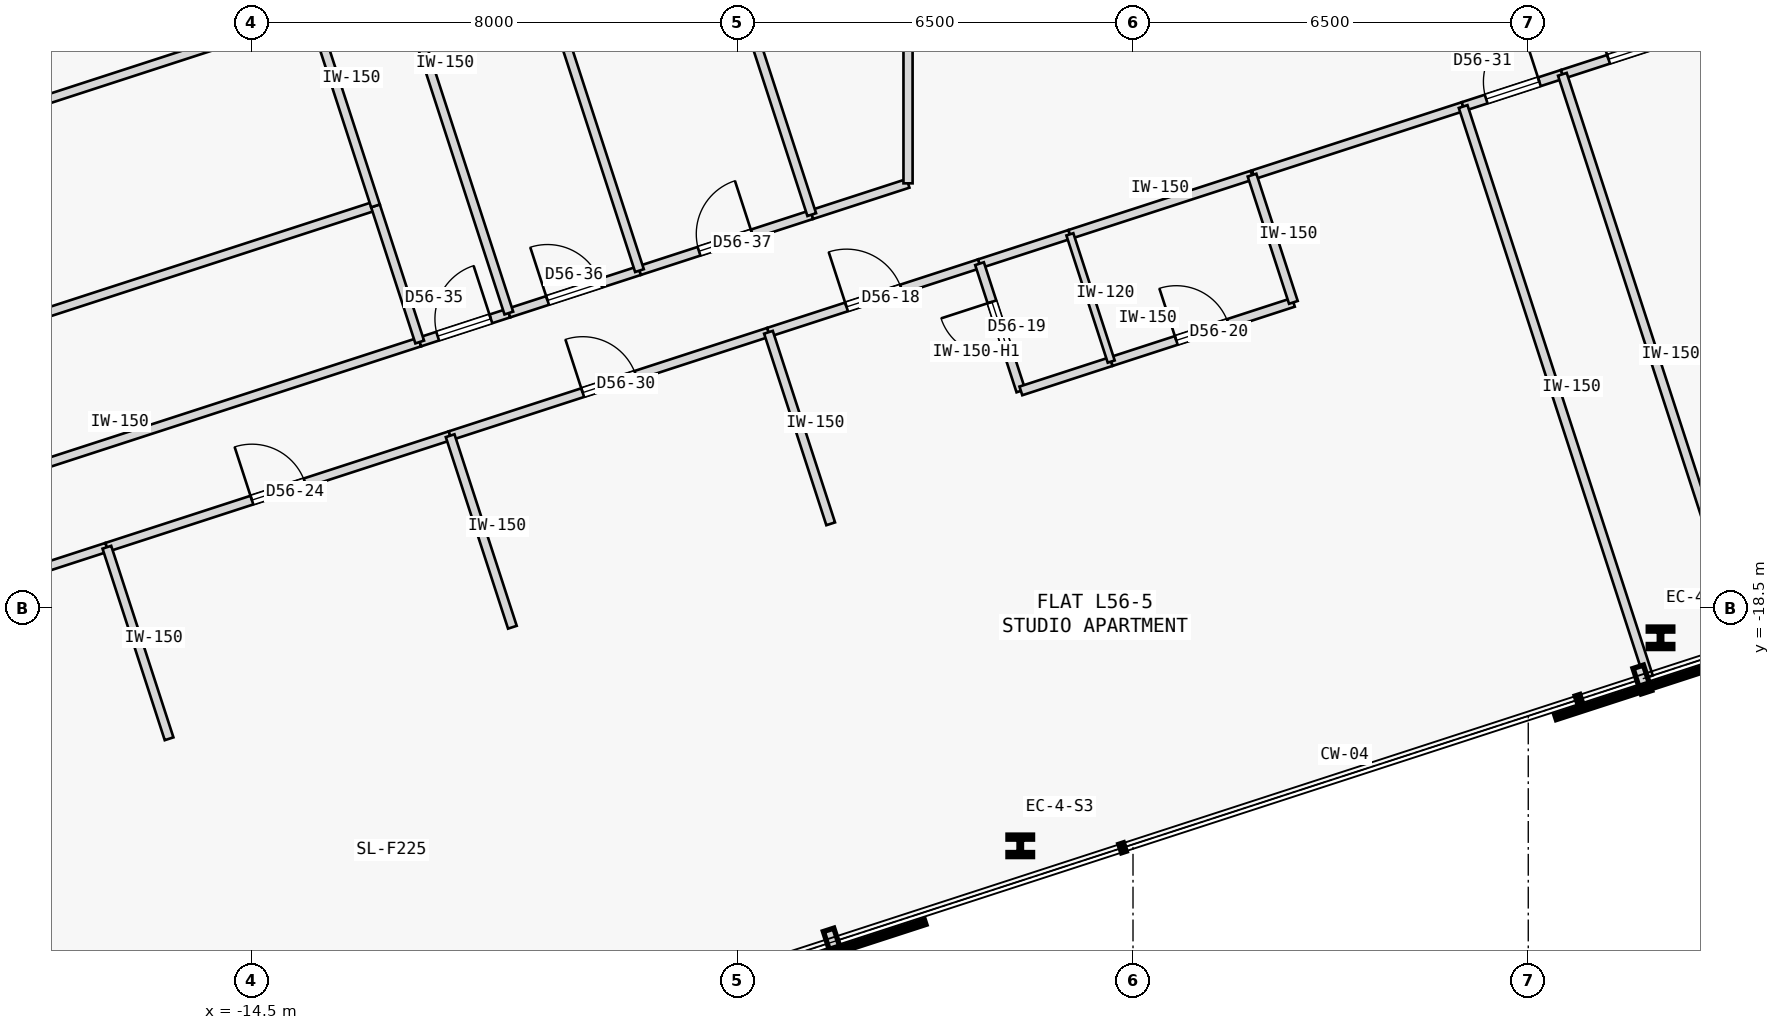
"""IFC4 building model, lengths in metres.
Left out: names, types, materials, properties, quantities, classifications, styles, units other than length and angle.
Written with IfcOpenShell. Run it as: python <this file> out.ifc"""

import sys

from ifc_helpers import new_model, si_unit, direction, frame, frame_2d, origin, origin_2d, place, context, subcontext, project, spatial, rectangle, i_section, extrude, element, fill, save


model = new_model("IFC4")
c1 = context("Model", 3, precision=1e-05, world=origin(), true_north=direction((0.0, 1.0)))
c2 = subcontext(c1, "Body", "Model", "MODEL_VIEW")
j1 = project(units=[si_unit("LENGTHUNIT", "METRE"), si_unit("PLANEANGLEUNIT", "RADIAN")], contexts=[c1])
p1 = place(None, origin())
s1 = spatial("IfcSite", under=j1, at=p1, CompositionType="ELEMENT")
p2 = place(p1, origin())
s2 = spatial("IfcBuilding", under=s1, at=p2, CompositionType="ELEMENT")
p3 = place(p2, frame((0.0, 0.0, 214.25)))
s3 = spatial("IfcBuildingStorey", under=s2, at=p3, CompositionType="ELEMENT", Elevation=214.25)
for number, where, z_axis, x_axis in (
    (1, (-1.854, -22.409, 0.0), (0.0, 0.0, 1.0), (1.0, 0.0, 0.0)),
    (2, (8.675, -18.988, 0.0), (0.0, 0.0, 1.0), (1.0, 0.0, 0.0)),
):
    element("IfcColumn", number, at=place(p3, frame(where, z_axis=z_axis, x_axis=x_axis)), inside=s3, PredefinedType="COLUMN", context=c2, shape_type="SweptSolid", body=[
        extrude(i_section(OverallWidth=0.405, OverallDepth=0.355, WebThickness=0.042, FlangeThickness=0.068, FilletRadius=0.015, at=origin_2d()), origin(), (0.0, 0.0, 1.0), 3.35),
    ])
p4 = place(p3, frame((-20.347, -18.626, 0.0), z_axis=(0.0, 0.0, 1.0), x_axis=(0.951057168147, 0.309014988174, 0.0)))
e3 = element("IfcWall", 3, at=p4, inside=s3, PredefinedType="PARTITIONING", context=c2, shape_type="SweptSolid", body=[
    extrude(rectangle(XDim=3.65, YDim=0.15, at=frame_2d((1.825, 0.0))), origin(), (0.0, 0.0, 1.0), 3.125),
])
p5 = place(p3, frame((-5.995, -13.963, 0.0), z_axis=(0.0, 0.0, 1.0), x_axis=(0.951050780541, 0.309034646652, 0.0)))
e4 = element("IfcWall", 4, at=p5, inside=s3, PredefinedType="PARTITIONING", context=c2, shape_type="SweptSolid", body=[
    extrude(rectangle(XDim=3.65, YDim=0.15, at=frame_2d((1.825, 0.0))), origin(), (0.0, 0.0, 1.0), 3.125),
])
p6 = place(p5, frame((1.35, 0.0, 0.0)))
e5 = element("IfcOpeningElement", 5, at=p6, cuts=e4, PredefinedType="OPENING", context=c2, shape_type="SweptSolid", body=[
    extrude(rectangle(XDim=0.95, YDim=2.15, at=frame_2d((0.475, 1.075))), frame((0.0, 0.085, 0.0), z_axis=(0.0, -1.0, 0.0), x_axis=(1.0, 0.0, 0.0)), (0.0, 0.0, 1.0), 0.17),
])
p7 = place(p3, frame((1.98, -11.372, 0.0), z_axis=(0.0, 0.0, 1.0), x_axis=(0.951052868128, 0.309028222052, 0.0)))
e6 = element("IfcWall", 6, at=p7, inside=s3, PredefinedType="PARTITIONING", context=c2, shape_type="SweptSolid", body=[
    extrude(rectangle(XDim=3.626, YDim=0.15, at=frame_2d((1.813, 0.0))), origin(), (0.0, 0.0, 1.0), 3.125),
])
p8 = place(p3, frame((-2.524, -12.835, 0.0), z_axis=(0.0, 0.0, 1.0), x_axis=(0.951062779317, 0.308997718112, 0.0)))
e7 = element("IfcWall", 7, at=p8, inside=s3, PredefinedType="PARTITIONING", context=c2, shape_type="SweptSolid", body=[
    extrude(rectangle(XDim=1.562, YDim=0.15, at=frame_2d((0.781, 0.0))), origin(), (0.0, 0.0, 1.0), 3.125),
])
p9 = place(p3, frame((-1.038, -12.352, 0.0), z_axis=(0.0, 0.0, 1.0), x_axis=(0.951058557014, 0.309010713619, 0.0)))
e8 = element("IfcWall", 8, at=p9, inside=s3, PredefinedType="PARTITIONING", context=c2, shape_type="SweptSolid", body=[
    extrude(rectangle(XDim=3.15, YDim=0.15, at=frame_2d((1.575, 0.0))), origin(), (0.0, 0.0, 1.0), 3.125),
])
p10 = place(p3, frame((-16.875, -17.498, 0.0), z_axis=(0.0, 0.0, 1.0), x_axis=(0.951057944303, 0.309012599384, 0.0)))
e9 = element("IfcWall", 9, at=p10, inside=s3, PredefinedType="PARTITIONING", context=c2, shape_type="SweptSolid", body=[
    extrude(rectangle(XDim=5.936, YDim=0.15, at=frame_2d((2.968, 0.0))), origin(), (0.0, 0.0, 1.0), 3.125),
])
p11 = place(p10, frame((2.508, 0.0, 0.0)))
e10 = element("IfcOpeningElement", 10, at=p11, cuts=e9, PredefinedType="OPENING", context=c2, shape_type="SweptSolid", body=[
    extrude(rectangle(XDim=0.92, YDim=2.15, at=frame_2d((0.46, 1.075))), frame((0.0, 0.085, 0.0), z_axis=(0.0, -1.0, 0.0), x_axis=(1.0, 0.0, 0.0)), (0.0, 0.0, 1.0), 0.17),
])
p12 = place(p3, frame((-29.45, -19.881, 0.0), z_axis=(0.0, 0.0, 1.0), x_axis=(0.95105650271, 0.309017036186, 0.0)))
e11 = element("IfcWall", 11, at=p12, inside=s3, PredefinedType="PARTITIONING", context=c2, shape_type="SweptSolid", body=[
    extrude(rectangle(XDim=18.632, YDim=0.15, at=frame_2d((9.316, 0.0))), origin(), (0.0, 0.0, 1.0), 3.125),
])
p13 = place(p12, frame((8.856, 0.0, 0.0)))
e12 = element("IfcOpeningElement", 12, at=p13, cuts=e11, PredefinedType="OPENING", context=c2, shape_type="SweptSolid", body=[
    extrude(rectangle(XDim=0.92, YDim=2.15, at=frame_2d((0.46, 1.075))), frame((0.0, 0.085, 0.0), z_axis=(0.0, -1.0, 0.0), x_axis=(1.0, 0.0, 0.0)), (0.0, 0.0, 1.0), 0.17),
])
p14 = place(p3, frame((-11.23, -15.664, 0.0), z_axis=(0.0, 0.0, 1.0), x_axis=(0.951055579382, 0.309019877882, 0.0)))
e13 = element("IfcWall", 13, at=p14, inside=s3, PredefinedType="PARTITIONING", context=c2, shape_type="SweptSolid", body=[
    extrude(rectangle(XDim=5.504, YDim=0.15, at=frame_2d((2.752, 0.0))), origin(), (0.0, 0.0, 1.0), 3.125),
])
p15 = place(p14, frame((2.292, 0.0, 0.0)))
e14 = element("IfcOpeningElement", 14, at=p15, cuts=e13, PredefinedType="OPENING", context=c2, shape_type="SweptSolid", body=[
    extrude(rectangle(XDim=0.92, YDim=2.15, at=frame_2d((0.46, 1.075))), frame((0.0, 0.085, 0.0), z_axis=(0.0, -1.0, 0.0), x_axis=(1.0, 0.0, 0.0)), (0.0, 0.0, 1.0), 0.17),
])
p16 = place(p3, frame((5.429, -10.251, 0.0), z_axis=(0.0, 0.0, 1.0), x_axis=(0.95104661559, 0.309047463953, 0.0)))
e15 = element("IfcWall", 15, at=p16, inside=s3, PredefinedType="PARTITIONING", context=c2, shape_type="SweptSolid", body=[
    extrude(rectangle(XDim=1.716, YDim=0.15, at=frame_2d((0.858, 0.0))), origin(), (0.0, 0.0, 1.0), 3.125),
])
p17 = place(p16, frame((0.398, 0.0, 0.0)))
e16 = element("IfcOpeningElement", 16, at=p17, cuts=e15, PredefinedType="OPENING", context=c2, shape_type="SweptSolid", body=[
    extrude(rectangle(XDim=0.92, YDim=2.15, at=frame_2d((0.46, 1.075))), frame((0.0, 0.085, 0.0), z_axis=(0.0, -1.0, 0.0), x_axis=(1.0, 0.0, 0.0)), (0.0, 0.0, 1.0), 0.17),
])
p18 = place(p3, frame((7.061, -9.721, 0.0), z_axis=(0.0, 0.0, 1.0), x_axis=(0.951051887333, 0.309031240494, 0.0)))
e17 = element("IfcWall", 17, at=p18, inside=s3, PredefinedType="PARTITIONING", context=c2, shape_type="SweptSolid", body=[
    extrude(rectangle(XDim=2.517, YDim=0.15, at=frame_2d((1.259, 0.0))), origin(), (0.0, 0.0, 1.0), 3.125),
])
p19 = place(p18, frame((0.799, 0.0, 0.0)))
e18 = element("IfcOpeningElement", 18, at=p19, cuts=e17, PredefinedType="OPENING", context=c2, shape_type="SweptSolid", body=[
    extrude(rectangle(XDim=0.92, YDim=2.15, at=frame_2d((0.46, 1.075))), frame((0.0, 0.085, 0.0), z_axis=(0.0, -1.0, 0.0), x_axis=(1.0, 0.0, 0.0)), (0.0, 0.0, 1.0), 0.17),
])
p20 = place(p3, frame((-11.73, -14.123, 0.0), z_axis=(0.0, 0.0, 1.0), x_axis=(0.951032904484, 0.309089654614, 0.0)))
e19 = element("IfcWall", 19, at=p20, inside=s3, PredefinedType="PARTITIONING", context=c2, shape_type="SweptSolid", body=[
    extrude(rectangle(XDim=1.541, YDim=0.15, at=frame_2d((0.771, 0.0))), origin(), (0.0, 0.0, 1.0), 3.125),
])
p21 = place(p20, frame((0.311, 0.0, 0.0)))
e20 = element("IfcOpeningElement", 20, at=p21, cuts=e19, PredefinedType="OPENING", context=c2, shape_type="SweptSolid", body=[
    extrude(rectangle(XDim=0.92, YDim=2.15, at=frame_2d((0.46, 1.075))), frame((0.0, 0.085, 0.0), z_axis=(0.0, -1.0, 0.0), x_axis=(1.0, 0.0, 0.0)), (0.0, 0.0, 1.0), 0.17),
])
p22 = place(p3, frame((-10.265, -13.647, 0.0), z_axis=(0.0, 0.0, 1.0), x_axis=(0.951065832698, 0.308988319964, 0.0)))
e21 = element("IfcWall", 21, at=p22, inside=s3, PredefinedType="PARTITIONING", context=c2, shape_type="SweptSolid", body=[
    extrude(rectangle(XDim=2.259, YDim=0.15, at=frame_2d((1.129, 0.0))), origin(), (0.0, 0.0, 1.0), 3.125),
])
p23 = place(p22, frame((0.669, 0.0, 0.0)))
e22 = element("IfcOpeningElement", 22, at=p23, cuts=e21, PredefinedType="OPENING", context=c2, shape_type="SweptSolid", body=[
    extrude(rectangle(XDim=0.92, YDim=2.15, at=frame_2d((0.46, 1.075))), frame((0.0, 0.085, 0.0), z_axis=(0.0, -1.0, 0.0), x_axis=(1.0, 0.0, 0.0)), (0.0, 0.0, 1.0), 0.17),
])
p24 = place(p3, frame((-8.116, -12.949, 0.0), z_axis=(0.0, 0.0, 1.0), x_axis=(0.95107320803, 0.308965617775, 0.0)))
e23 = element("IfcWall", 23, at=p24, inside=s3, PredefinedType="PARTITIONING", context=c2, shape_type="SweptSolid", body=[
    extrude(rectangle(XDim=2.979, YDim=0.15, at=frame_2d((1.49, 0.0))), origin(), (0.0, 0.0, 1.0), 3.125),
])
p25 = place(p24, frame((1.03, 0.0, 0.0)))
e24 = element("IfcOpeningElement", 24, at=p25, cuts=e23, PredefinedType="OPENING", context=c2, shape_type="SweptSolid", body=[
    extrude(rectangle(XDim=0.92, YDim=2.15, at=frame_2d((0.46, 1.075))), frame((0.0, 0.085, 0.0), z_axis=(0.0, -1.0, 0.0), x_axis=(1.0, 0.0, 0.0)), (0.0, 0.0, 1.0), 0.17),
])
p26 = place(p3, frame((-5.283, -12.028, 0.0), z_axis=(0.0, 0.0, 1.0), x_axis=(0.951031913627, 0.309092703349, 0.0)))
e25 = element("IfcWall", 25, at=p26, inside=s3, PredefinedType="PARTITIONING", context=c2, shape_type="SweptSolid", body=[
    extrude(rectangle(XDim=1.665, YDim=0.15, at=frame_2d((0.833, 0.0))), origin(), (0.0, 0.0, 1.0), 3.125),
])
p27 = place(p3, frame((-3.7, -11.514, 0.0), z_axis=(0.0, 0.0, 1.0), x_axis=(-8.2572974e-05, 0.999999996591, 0.0)))
e26 = element("IfcWall", 26, at=p27, inside=s3, PredefinedType="PARTITIONING", context=c2, shape_type="SweptSolid", body=[
    extrude(rectangle(XDim=5.913, YDim=0.15, at=frame_2d((2.957, 0.0))), origin(), (0.0, 0.0, 1.0), 3.125),
])
p28 = place(p27, frame((2.497, 0.0, 0.0)))
e27 = element("IfcOpeningElement", 27, at=p28, cuts=e26, PredefinedType="OPENING", context=c2, shape_type="SweptSolid", body=[
    extrude(rectangle(XDim=0.92, YDim=2.15, at=frame_2d((0.46, 1.075))), frame((0.0, 0.085, 0.0), z_axis=(0.0, -1.0, 0.0), x_axis=(1.0, 0.0, 0.0)), (0.0, 0.0, 1.0), 0.17),
])
p29 = place(p3, frame((-15.852, -20.648, 0.0), z_axis=(0.0, 0.0, 1.0), x_axis=(-0.309009398695, 0.951058984248, 0.0)))
e28 = element("IfcWall", 28, at=p29, inside=s3, PredefinedType="PARTITIONING", context=c2, shape_type="SweptSolid", body=[
    extrude(rectangle(XDim=3.312, YDim=0.15, at=frame_2d((1.656, 0.0))), origin(), (0.0, 0.0, 1.0), 3.125),
])
p30 = place(p3, frame((-1.844, -14.927, 0.0), z_axis=(0.0, 0.0, 1.0), x_axis=(-0.309060979314, 0.951042223598, 0.0)))
e29 = element("IfcWall", 29, at=p30, inside=s3, PredefinedType="PARTITIONING", context=c2, shape_type="SweptSolid", body=[
    extrude(rectangle(XDim=2.2, YDim=0.15, at=frame_2d((1.1, 0.0))), origin(), (0.0, 0.0, 1.0), 2.675),
])
p31 = place(p30, frame((0.66, 0.0, 0.0)))
e30 = element("IfcOpeningElement", 30, at=p31, cuts=e29, PredefinedType="OPENING", context=c2, shape_type="SweptSolid", body=[
    extrude(rectangle(XDim=0.88, YDim=2.15, at=frame_2d((0.44, 1.075))), frame((0.0, 0.085, 0.0), z_axis=(0.0, -1.0, 0.0), x_axis=(1.0, 0.0, 0.0)), (0.0, 0.0, 1.0), 0.17),
])
p32 = place(p3, frame((-1.844, -14.927, 0.0), z_axis=(0.0, 0.0, 1.0), x_axis=(0.951062779317, 0.308997718112, 0.0)))
e31 = element("IfcWall", 31, at=p32, inside=s3, PredefinedType="PARTITIONING", context=c2, shape_type="SweptSolid", body=[
    extrude(rectangle(XDim=1.562, YDim=0.15, at=frame_2d((0.781, 0.0))), origin(), (0.0, 0.0, 1.0), 3.125),
])
p33 = place(p3, frame((-0.358, -14.445, 0.0), z_axis=(0.0, 0.0, 1.0), x_axis=(0.951051155468, 0.309033492816, 0.0)))
e32 = element("IfcWall", 32, at=p33, inside=s3, PredefinedType="PARTITIONING", context=c2, shape_type="SweptSolid", body=[
    extrude(rectangle(XDim=3.15, YDim=0.15, at=frame_2d((1.575, 0.0))), origin(), (0.0, 0.0, 1.0), 3.125),
])
p34 = place(p33, frame((1.125, 0.0, 0.0)))
e33 = element("IfcOpeningElement", 33, at=p34, cuts=e32, PredefinedType="OPENING", context=c2, shape_type="SweptSolid", body=[
    extrude(rectangle(XDim=0.9, YDim=2.15, at=frame_2d((0.45, 1.075))), frame((0.0, 0.085, 0.0), z_axis=(0.0, -1.0, 0.0), x_axis=(1.0, 0.0, 0.0)), (0.0, 0.0, 1.0), 0.17),
])
p35 = place(p3, frame((2.637, -13.471, 0.0), z_axis=(0.0, 0.0, 1.0), x_axis=(-0.308960600764, 0.951074837842, 0.0)))
e34 = element("IfcWall", 34, at=p35, inside=s3, PredefinedType="PARTITIONING", context=c2, shape_type="SweptSolid", body=[
    extrude(rectangle(XDim=2.2, YDim=0.15, at=frame_2d((1.1, 0.0))), origin(), (0.0, 0.0, 1.0), 3.125),
])
p36 = place(p3, frame((-4.972, -17.113, 0.0), z_axis=(0.0, 0.0, 1.0), x_axis=(-0.309009398695, 0.951058984248, 0.0)))
e35 = element("IfcWall", 35, at=p36, inside=s3, PredefinedType="PARTITIONING", context=c2, shape_type="SweptSolid", body=[
    extrude(rectangle(XDim=3.312, YDim=0.15, at=frame_2d((1.656, 0.0))), origin(), (0.0, 0.0, 1.0), 3.125),
])
p37 = place(p3, frame((8.476, -19.63, 0.0), z_axis=(0.0, 0.0, 1.0), x_axis=(-0.308999867152, 0.951062081097, 0.0)))
e36 = element("IfcWall", 36, at=p37, inside=s3, PredefinedType="PARTITIONING", context=c2, shape_type="SweptSolid", body=[
    extrude(rectangle(XDim=9.862, YDim=0.15, at=frame_2d((4.931, 0.0))), origin(), (0.0, 0.0, 1.0), 3.125),
])
p38 = place(p3, frame((-0.358, -14.445, 0.0), z_axis=(0.0, 0.0, 1.0), x_axis=(-0.309060979314, 0.951042223598, 0.0)))
e37 = element("IfcWall", 37, at=p38, inside=s3, PredefinedType="PARTITIONING", context=c2, shape_type="SweptSolid", body=[
    extrude(rectangle(XDim=2.2, YDim=0.12, at=frame_2d((1.1, 0.0))), origin(), (0.0, 0.0, 1.0), 3.125),
])
p39 = place(p3, frame((-10.206, -18.814, 0.0), z_axis=(0.0, 0.0, 1.0), x_axis=(-0.309076071769, 0.951037318857, 0.0)))
e38 = element("IfcWall", 38, at=p39, inside=s3, PredefinedType="PARTITIONING", context=c2, shape_type="SweptSolid", body=[
    extrude(rectangle(XDim=3.312, YDim=0.15, at=frame_2d((1.656, 0.0))), origin(), (0.0, 0.0, 1.0), 3.125),
])
p40 = place(p3, frame((-30.178, -17.642, 0.0), z_axis=(0.0, 0.0, 1.0), x_axis=(0.95105650271, 0.309017036186, 0.0)))
e39 = element("IfcWall", 39, at=p40, inside=s3, PredefinedType="PARTITIONING", context=c2, shape_type="SweptSolid", body=[
    extrude(rectangle(XDim=18.632, YDim=0.15, at=frame_2d((9.316, 0.0))), origin(), (0.0, 0.0, 1.0), 3.125),
])
p41 = place(p40, frame((8.856, 0.0, 0.0)))
e40 = element("IfcOpeningElement", 40, at=p41, cuts=e39, PredefinedType="OPENING", context=c2, shape_type="SweptSolid", body=[
    extrude(rectangle(XDim=0.92, YDim=2.15, at=frame_2d((0.46, 1.075))), frame((0.0, 0.085, 0.0), z_axis=(0.0, -1.0, 0.0), x_axis=(1.0, 0.0, 0.0)), (0.0, 0.0, 1.0), 0.17),
])
p42 = place(p3, frame((-11.73, -14.123, 0.0), z_axis=(0.0, 0.0, 1.0), x_axis=(-0.309062621189, 0.951041690035, 0.0)))
e41 = element("IfcWall", 41, at=p42, inside=s3, PredefinedType="PARTITIONING", context=c2, shape_type="SweptSolid", body=[
    extrude(rectangle(XDim=2.354, YDim=0.15, at=frame_2d((1.177, 0.0))), origin(), (0.0, 0.0, 1.0), 3.125),
])
p43 = place(p3, frame((-31.208, -14.471, 0.0), z_axis=(0.0, 0.0, 1.0), x_axis=(0.951057753948, 0.309013185244, 0.0)))
e42 = element("IfcWall", 42, at=p43, inside=s3, PredefinedType="PARTITIONING", context=c2, shape_type="SweptSolid", body=[
    extrude(rectangle(XDim=18.632, YDim=0.15, at=frame_2d((9.316, 0.0))), origin(), (0.0, 0.0, 1.0), 3.125),
])
p44 = place(p3, frame((-12.458, -11.884, 0.0), z_axis=(0.0, 0.0, 1.0), x_axis=(-0.308946982245, 0.951079261766, 0.0)))
e43 = element("IfcWall", 43, at=p44, inside=s3, PredefinedType="PARTITIONING", context=c2, shape_type="SweptSolid", body=[
    extrude(rectangle(XDim=3.334, YDim=0.15, at=frame_2d((1.667, 0.0))), origin(), (0.0, 0.0, 1.0), 3.125),
])
p45 = place(p3, frame((-30.663, -9.757, 0.0), z_axis=(0.0, 0.0, 1.0), x_axis=(0.951058192995, 0.309011833974, 0.0)))
e44 = element("IfcWall", 44, at=p45, inside=s3, PredefinedType="PARTITIONING", context=c2, shape_type="SweptSolid", body=[
    extrude(rectangle(XDim=16.657, YDim=0.15, at=frame_2d((8.329, 0.0))), origin(), (0.0, 0.0, 1.0), 3.125),
])
p46 = place(p3, frame((10.108, -19.1, 0.0), z_axis=(0.0, 0.0, 1.0), x_axis=(-0.309022258842, 0.95105480575, 0.0)))
e45 = element("IfcWall", 45, at=p46, inside=s3, PredefinedType="PARTITIONING", context=c2, shape_type="SweptSolid", body=[
    extrude(rectangle(XDim=9.862, YDim=0.15, at=frame_2d((4.931, 0.0))), origin(), (0.0, 0.0, 1.0), 3.125),
])
p47 = place(p3, frame((-10.265, -13.647, 0.0), z_axis=(0.0, 0.0, 1.0), x_axis=(-0.309007776314, 0.951059511375, 0.0)))
e46 = element("IfcWall", 46, at=p47, inside=s3, PredefinedType="PARTITIONING", context=c2, shape_type="SweptSolid", body=[
    extrude(rectangle(XDim=8.461, YDim=0.15, at=frame_2d((4.23, 0.0))), origin(), (0.0, 0.0, 1.0), 3.125),
])
p48 = place(p3, frame((-8.116, -12.949, 0.0), z_axis=(0.0, 0.0, 1.0), x_axis=(-0.309005340707, 0.951060302722, 0.0)))
e47 = element("IfcWall", 47, at=p48, inside=s3, PredefinedType="PARTITIONING", context=c2, shape_type="SweptSolid", body=[
    extrude(rectangle(XDim=7.727, YDim=0.15, at=frame_2d((3.864, 0.0))), origin(), (0.0, 0.0, 1.0), 3.125),
])
p49 = place(p3, frame((-5.283, -12.028, 0.0), z_axis=(0.0, 0.0, 1.0), x_axis=(-0.30901256406, 0.95105795578, 0.0)))
e48 = element("IfcWall", 48, at=p49, inside=s3, PredefinedType="PARTITIONING", context=c2, shape_type="SweptSolid", body=[
    extrude(rectangle(XDim=6.759, YDim=0.15, at=frame_2d((3.379, 0.0))), origin(), (0.0, 0.0, 1.0), 3.125),
])
p50 = place(p6, origin())
e49 = element("IfcDoor", 49, at=p50, inside=s3, OperationType="SINGLE_SWING_LEFT", PredefinedType="DOOR", context=c2, shape_type="SweptSolid", body=[
    extrude(rectangle(XDim=0.95, YDim=2.15, at=frame_2d((0.475, 1.075))), frame((0.0, 0.025, 0.0), z_axis=(0.0, -1.0, 0.0), x_axis=(1.0, 0.0, 0.0)), (0.0, 0.0, 1.0), 0.05),
])
fill(e5, e49)
p51 = place(p31, origin())
e50 = element("IfcDoor", 50, at=p51, inside=s3, OperationType="SINGLE_SWING_RIGHT", PredefinedType="DOOR", context=c2, shape_type="SweptSolid", body=[
    extrude(rectangle(XDim=0.88, YDim=2.15, at=frame_2d((0.44, 1.075))), frame((0.0, 0.025, 0.0), z_axis=(0.0, -1.0, 0.0), x_axis=(1.0, 0.0, 0.0)), (0.0, 0.0, 1.0), 0.05),
])
fill(e30, e50)
p52 = place(p34, origin())
e51 = element("IfcDoor", 51, at=p52, inside=s3, OperationType="SINGLE_SWING_LEFT", PredefinedType="DOOR", context=c2, shape_type="SweptSolid", body=[
    extrude(rectangle(XDim=0.9, YDim=2.15, at=frame_2d((0.45, 1.075))), frame((0.0, 0.025, 0.0), z_axis=(0.0, -1.0, 0.0), x_axis=(1.0, 0.0, 0.0)), (0.0, 0.0, 1.0), 0.05),
])
fill(e33, e51)
p53 = place(p11, origin())
e52 = element("IfcDoor", 52, at=p53, inside=s3, OperationType="SINGLE_SWING_LEFT", PredefinedType="DOOR", context=c2, shape_type="SweptSolid", body=[
    extrude(rectangle(XDim=0.92, YDim=2.15, at=frame_2d((0.46, 1.075))), frame((0.0, 0.025, 0.0), z_axis=(0.0, -1.0, 0.0), x_axis=(1.0, 0.0, 0.0)), (0.0, 0.0, 1.0), 0.05),
])
fill(e10, e52)
p54 = place(p15, origin())
e53 = element("IfcDoor", 53, at=p54, inside=s3, OperationType="SINGLE_SWING_LEFT", PredefinedType="DOOR", context=c2, shape_type="SweptSolid", body=[
    extrude(rectangle(XDim=0.92, YDim=2.15, at=frame_2d((0.46, 1.075))), frame((0.0, 0.025, 0.0), z_axis=(0.0, -1.0, 0.0), x_axis=(1.0, 0.0, 0.0)), (0.0, 0.0, 1.0), 0.05),
])
fill(e14, e53)
p55 = place(p17, origin())
e54 = element("IfcDoor", 54, at=p55, inside=s3, OperationType="SINGLE_SWING_RIGHT", PredefinedType="DOOR", context=c2, shape_type="SweptSolid", body=[
    extrude(rectangle(XDim=0.92, YDim=2.15, at=frame_2d((0.46, 1.075))), frame((0.0, 0.025, 0.0), z_axis=(0.0, -1.0, 0.0), x_axis=(1.0, 0.0, 0.0)), (0.0, 0.0, 1.0), 0.05),
])
fill(e16, e54)
p56 = place(p19, origin())
e55 = element("IfcDoor", 55, at=p56, inside=s3, OperationType="SINGLE_SWING_LEFT", PredefinedType="DOOR", context=c2, shape_type="SweptSolid", body=[
    extrude(rectangle(XDim=0.92, YDim=2.15, at=frame_2d((0.46, 1.075))), frame((0.0, 0.025, 0.0), z_axis=(0.0, -1.0, 0.0), x_axis=(1.0, 0.0, 0.0)), (0.0, 0.0, 1.0), 0.05),
])
fill(e18, e55)
p57 = place(p21, origin())
e56 = element("IfcDoor", 56, at=p57, inside=s3, OperationType="SINGLE_SWING_RIGHT", PredefinedType="DOOR", context=c2, shape_type="SweptSolid", body=[
    extrude(rectangle(XDim=0.92, YDim=2.15, at=frame_2d((0.46, 1.075))), frame((0.0, 0.025, 0.0), z_axis=(0.0, -1.0, 0.0), x_axis=(1.0, 0.0, 0.0)), (0.0, 0.0, 1.0), 0.05),
])
fill(e20, e56)
p58 = place(p23, origin())
e57 = element("IfcDoor", 57, at=p58, inside=s3, OperationType="SINGLE_SWING_LEFT", PredefinedType="DOOR", context=c2, shape_type="SweptSolid", body=[
    extrude(rectangle(XDim=0.92, YDim=2.15, at=frame_2d((0.46, 1.075))), frame((0.0, 0.025, 0.0), z_axis=(0.0, -1.0, 0.0), x_axis=(1.0, 0.0, 0.0)), (0.0, 0.0, 1.0), 0.05),
])
fill(e22, e57)
p59 = place(p25, origin())
e58 = element("IfcDoor", 58, at=p59, inside=s3, OperationType="SINGLE_SWING_RIGHT", PredefinedType="DOOR", context=c2, shape_type="SweptSolid", body=[
    extrude(rectangle(XDim=0.92, YDim=2.15, at=frame_2d((0.46, 1.075))), frame((0.0, 0.025, 0.0), z_axis=(0.0, -1.0, 0.0), x_axis=(1.0, 0.0, 0.0)), (0.0, 0.0, 1.0), 0.05),
])
fill(e24, e58)
save(model, sys.argv[1])
